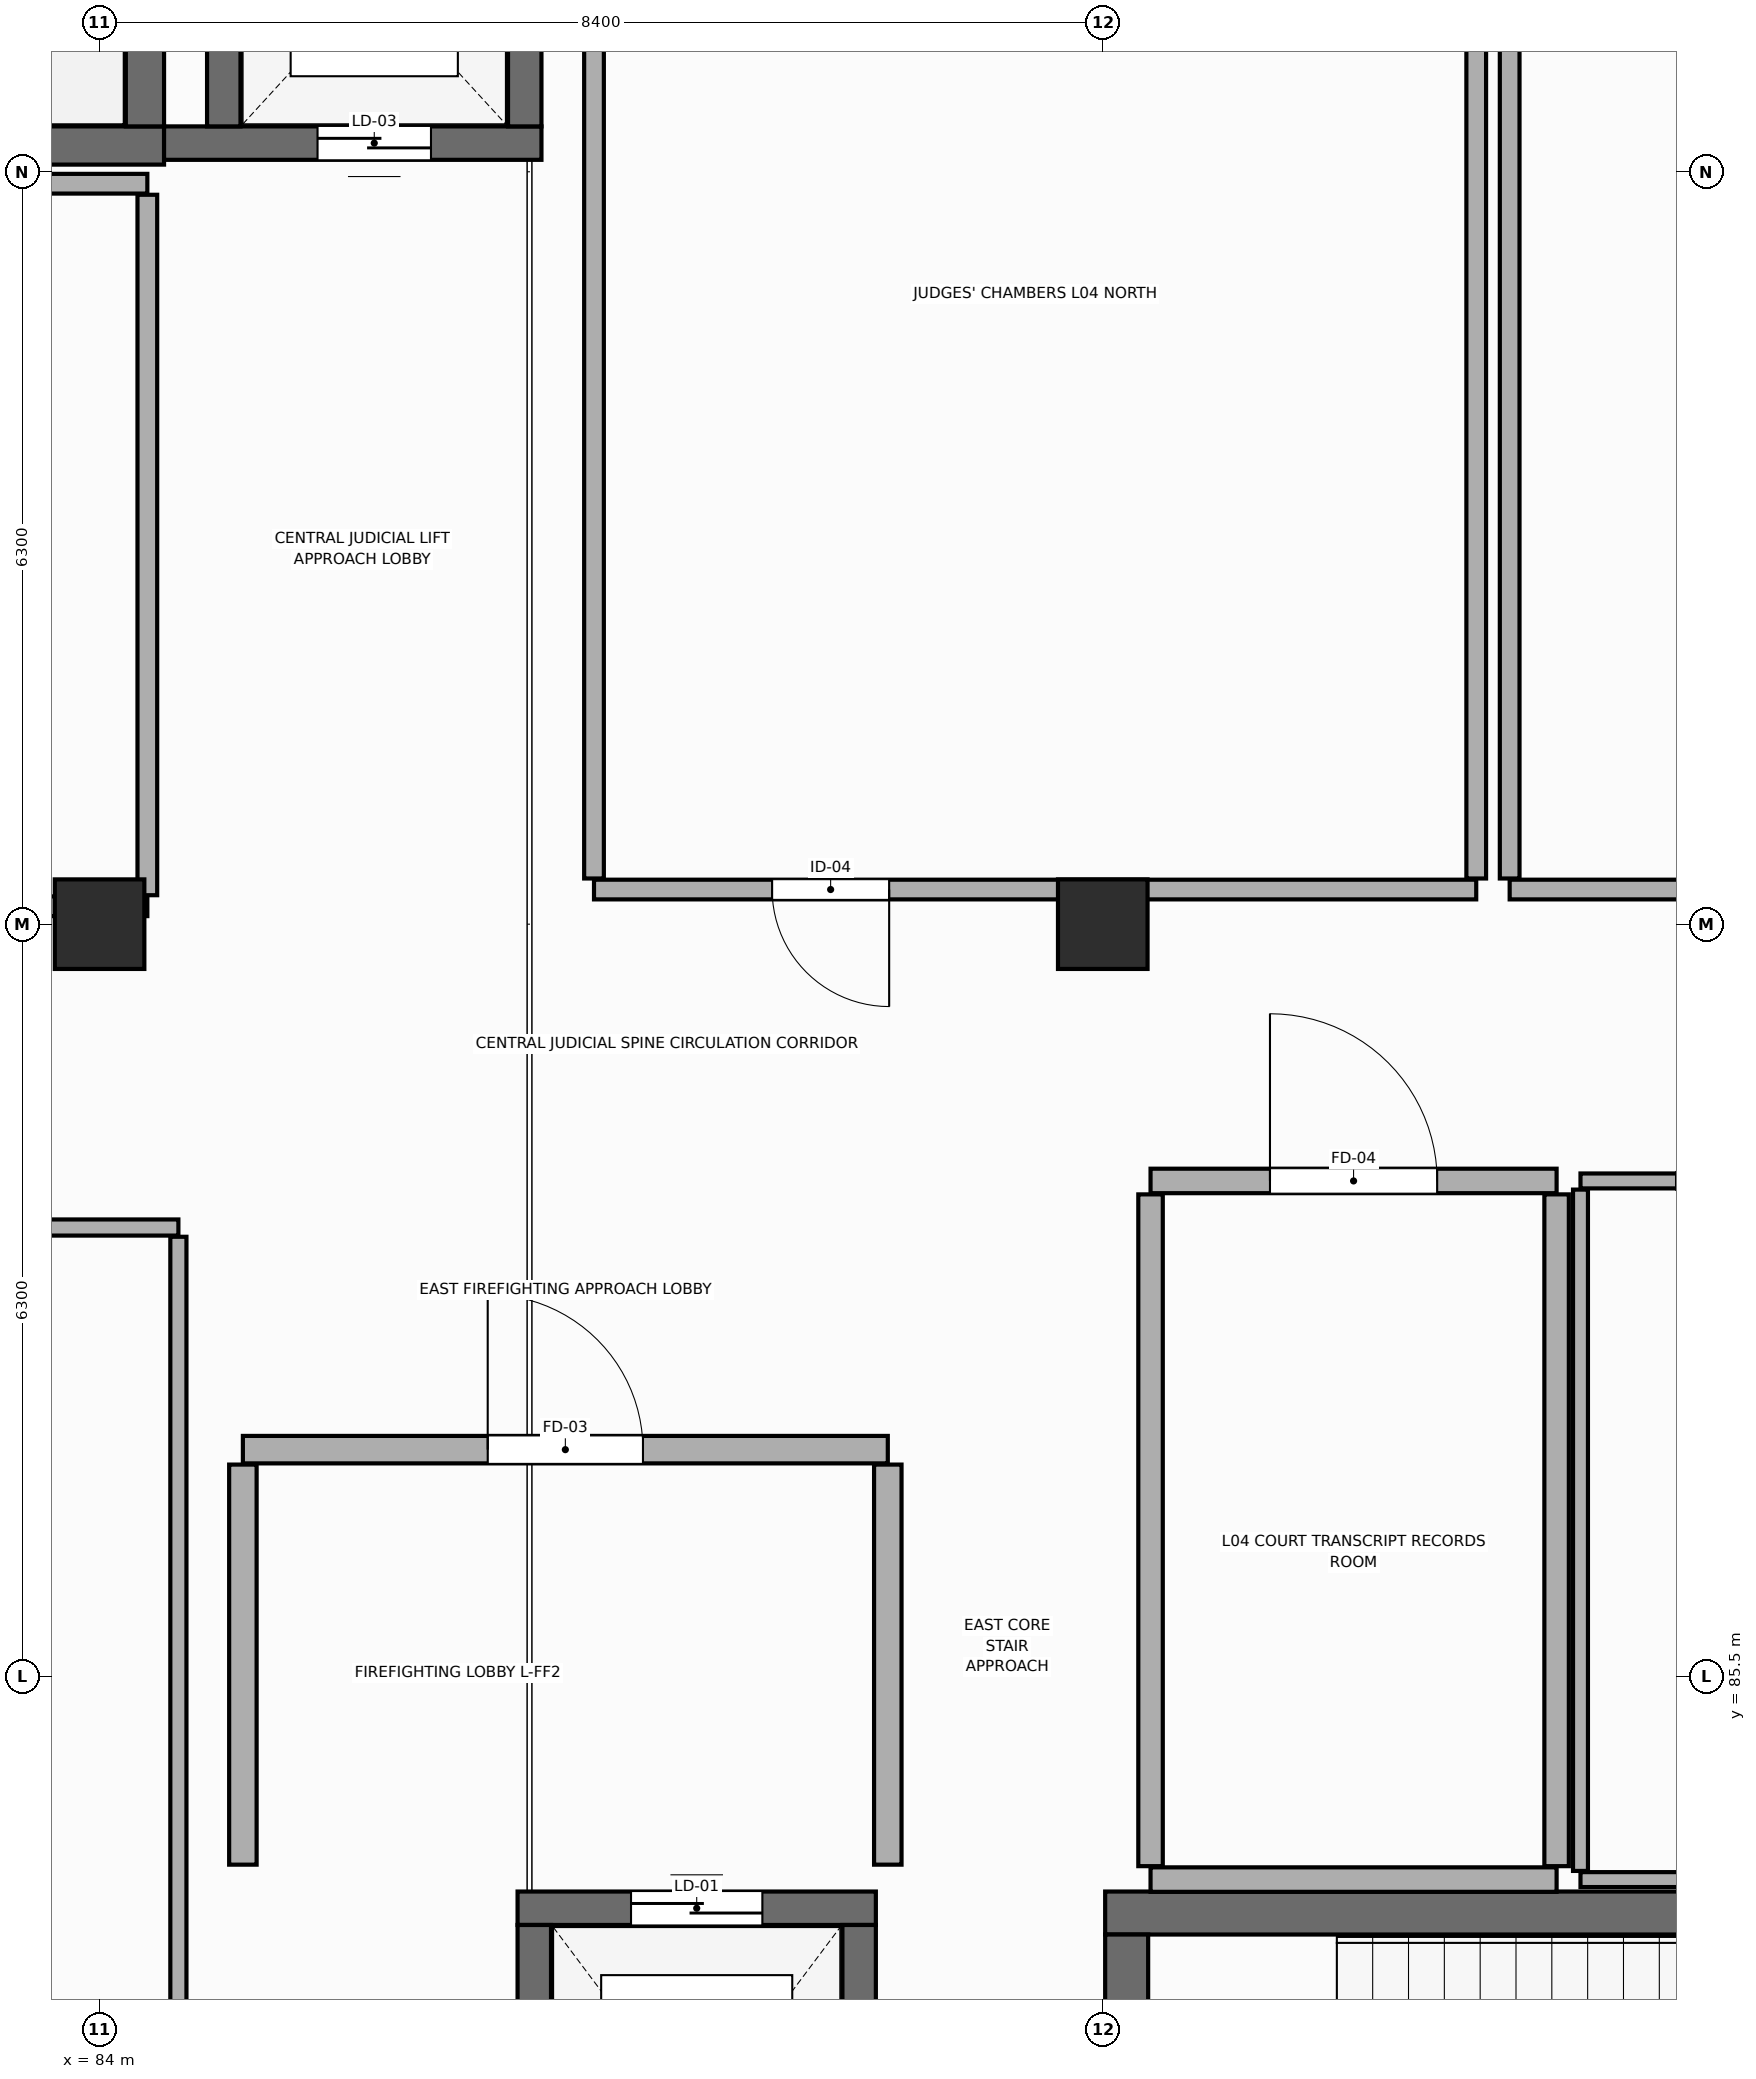
"""IFC4 building model, lengths in metres.
Left out: names, types, materials, properties, quantities, classifications, styles, units other than length and angle.
Written with IfcOpenShell. Run it as: python <this file> out.ifc"""

import sys

from ifc_helpers import new_model, si_unit, direction, frame, frame_2d, origin, origin_2d, place, context, subcontext, project, spatial, rectangle, extrude, element, fill, save


model = new_model("IFC4")
c1 = context("Model", 3, precision=1e-05, world=origin(), true_north=direction((0.0, 1.0)))
c2 = subcontext(c1, "Body", "Model", "MODEL_VIEW")
j1 = project(units=[si_unit("LENGTHUNIT", "METRE"), si_unit("PLANEANGLEUNIT", "RADIAN")], contexts=[c1])
p1 = place(None, origin())
s1 = spatial("IfcSite", under=j1, at=p1, CompositionType="ELEMENT")
p2 = place(p1, origin())
s2 = spatial("IfcBuilding", under=s1, at=p2, CompositionType="ELEMENT")
p3 = place(p2, frame((0.0, 0.0, 14.4)))
s3 = spatial("IfcBuildingStorey", under=s2, at=p3, CompositionType="ELEMENT", Elevation=14.4)
for number, where, z_axis, x_axis in (
    (1, (84.0, 91.8, 0.0), (0.0, 0.0, 1.0), (1.0, 0.0, 0.0)),
    (2, (92.4, 91.8, 0.0), (0.0, 0.0, 1.0), (1.0, 0.0, 0.0)),
):
    element("IfcColumn", number, at=place(p3, frame(where, z_axis=z_axis, x_axis=x_axis)), inside=s3, PredefinedType="COLUMN", context=c2, shape_type="SweptSolid", body=[
        extrude(rectangle(XDim=0.75, YDim=0.75, at=origin_2d()), origin(), (0.0, 0.0, 1.0), 4.2),
    ])
p4 = place(p3, frame((92.42, 83.52, 0.0), z_axis=(0.0, 0.0, 1.0), x_axis=(1.0, 0.0, 0.0)))
e3 = element("IfcWall", 3, at=p4, inside=s3, PredefinedType="SHEAR", context=c2, shape_type="SweptSolid", body=[
    extrude(rectangle(XDim=9.36, YDim=0.36, at=frame_2d((4.68, 0.0))), origin(), (0.0, 0.0, 1.0), 3.96),
])
p5 = place(p3, frame((92.6, 79.98, 0.0), z_axis=(0.0, 0.0, 1.0), x_axis=(0.0, 1.0, 0.0)))
e4 = element("IfcWall", 4, at=p5, inside=s3, PredefinedType="SHEAR", context=c2, shape_type="SweptSolid", body=[
    extrude(rectangle(XDim=3.36, YDim=0.36, at=frame_2d((1.68, 0.0))), origin(), (0.0, 0.0, 1.0), 3.96),
])
p6 = place(p5, frame((1.08, 0.0, 0.0)))
e5 = element("IfcOpeningElement", 5, at=p6, cuts=e4, PredefinedType="OPENING", context=c2, shape_type="SweptSolid", body=[
    extrude(rectangle(XDim=1.2, YDim=2.2, at=frame_2d((0.6, 1.1))), frame((0.0, 0.19, 0.0), z_axis=(0.0, -1.0, 0.0), x_axis=(1.0, 0.0, 0.0)), (0.0, 0.0, 1.0), 0.38),
])
p7 = place(p3, frame((84.54, 98.32, 0.0), z_axis=(0.0, 0.0, 1.0), x_axis=(-1.0, 0.0, 0.0)))
e6 = element("IfcWall", 6, at=p7, inside=s3, PredefinedType="SHEAR", context=c2, shape_type="SweptSolid", body=[
    extrude(rectangle(XDim=9.08, YDim=0.32, at=frame_2d((4.54, 0.0))), origin(), (0.0, 0.0, 1.0), 3.96),
])
p8 = place(p3, frame((84.38, 101.76, 0.0), z_axis=(0.0, 0.0, 1.0), x_axis=(0.0, -1.0, 0.0)))
e7 = element("IfcWall", 7, at=p8, inside=s3, PredefinedType="SHEAR", context=c2, shape_type="SweptSolid", body=[
    extrude(rectangle(XDim=3.28, YDim=0.32, at=frame_2d((1.64, 0.0))), origin(), (0.0, 0.0, 1.0), 3.96),
])
p9 = place(p3, frame((87.5, 83.56, 0.0), z_axis=(0.0, 0.0, 1.0), x_axis=(1.0, 0.0, 0.0)))
e8 = element("IfcWall", 8, at=p9, inside=s3, PredefinedType="SHEAR", context=c2, shape_type="SweptSolid", body=[
    extrude(rectangle(XDim=3.0, YDim=0.28, at=frame_2d((1.5, 0.0))), origin(), (0.0, 0.0, 1.0), 3.96),
])
p10 = place(p9, frame((0.95, 0.0, 0.0)))
e9 = element("IfcOpeningElement", 9, at=p10, cuts=e8, PredefinedType="OPENING", context=c2, shape_type="SweptSolid", body=[
    extrude(rectangle(XDim=1.1, YDim=2.2, at=frame_2d((0.55, 1.1))), frame((0.0, 0.15, 0.0), z_axis=(0.0, -1.0, 0.0), x_axis=(1.0, 0.0, 0.0)), (0.0, 0.0, 1.0), 0.3),
])
for number, where, z_axis, x_axis in (
    (10, (87.64, 80.18, 0.0), (0.0, 0.0, 1.0), (0.0, 1.0, 0.0)),
    (11, (90.36, 83.42, 0.0), (0.0, 0.0, 1.0), (0.0, -1.0, 0.0)),
):
    element("IfcWall", number, at=place(p3, frame(where, z_axis=z_axis, x_axis=x_axis)), inside=s3, PredefinedType="SHEAR", context=c2, shape_type="SweptSolid", body=[
        extrude(rectangle(XDim=3.24, YDim=0.28, at=frame_2d((1.62, 0.0))), origin(), (0.0, 0.0, 1.0), 3.96),
    ])
p11 = place(p3, frame((87.7, 98.34, 0.0), z_axis=(0.0, 0.0, 1.0), x_axis=(-1.0, 0.0, 0.0)))
e12 = element("IfcWall", 12, at=p11, inside=s3, PredefinedType="SHEAR", context=c2, shape_type="SweptSolid", body=[
    extrude(rectangle(XDim=3.16, YDim=0.28, at=frame_2d((1.58, 0.0))), origin(), (0.0, 0.0, 1.0), 3.96),
])
p12 = place(p11, frame((0.925, 0.0, 0.0)))
e13 = element("IfcOpeningElement", 13, at=p12, cuts=e12, PredefinedType="OPENING", context=c2, shape_type="SweptSolid", body=[
    extrude(rectangle(XDim=0.95, YDim=2.15, at=frame_2d((0.475, 1.075))), frame((0.0, 0.15, 0.0), z_axis=(0.0, -1.0, 0.0), x_axis=(1.0, 0.0, 0.0)), (0.0, 0.0, 1.0), 0.3),
])
for number, where, z_axis, x_axis in (
    (14, (85.04, 98.48, 0.0), (0.0, 0.0, 1.0), (0.0, 1.0, 0.0)),
    (15, (87.56, 100.92, 0.0), (0.0, 0.0, 1.0), (0.0, -1.0, 0.0)),
):
    element("IfcWall", number, at=place(p3, frame(where, z_axis=z_axis, x_axis=x_axis)), inside=s3, PredefinedType="SHEAR", context=c2, shape_type="SweptSolid", body=[
        extrude(rectangle(XDim=2.44, YDim=0.28, at=frame_2d((1.22, 0.0))), origin(), (0.0, 0.0, 1.0), 3.96),
    ])
p13 = place(p3, frame((85.2, 87.4, 0.0), z_axis=(0.0, 0.0, 1.0), x_axis=(1.0, 0.0, 0.0)))
e16 = element("IfcWall", 16, at=p13, inside=s3, PredefinedType="STANDARD", context=c2, shape_type="SweptSolid", body=[
    extrude(rectangle(XDim=5.4, YDim=0.23, at=frame_2d((2.7, 0.0))), origin(), (0.0, 0.0, 1.0), 3.34),
])
p14 = place(p13, frame((2.05, 0.0, 0.0)))
e17 = element("IfcOpeningElement", 17, at=p14, cuts=e16, PredefinedType="OPENING", context=c2, shape_type="SweptSolid", body=[
    extrude(rectangle(XDim=1.3, YDim=2.2, at=frame_2d((0.65, 1.1))), frame((0.0, 0.125, 0.0), z_axis=(0.0, -1.0, 0.0), x_axis=(1.0, 0.0, 0.0)), (0.0, 0.0, 1.0), 0.25),
])
for number, where, z_axis, x_axis in (
    (18, (85.2, 83.925, 0.0), (0.0, 0.0, 1.0), (0.0, 1.0, 0.0)),
    (19, (90.6, 87.275, 0.0), (0.0, 0.0, 1.0), (0.0, -1.0, 0.0)),
):
    element("IfcWall", number, at=place(p3, frame(where, z_axis=z_axis, x_axis=x_axis)), inside=s3, PredefinedType="STANDARD", context=c2, shape_type="SweptSolid", body=[
        extrude(rectangle(XDim=3.35, YDim=0.23, at=frame_2d((1.675, 0.0))), origin(), (0.0, 0.0, 1.0), 3.34),
    ])
p15 = place(p3, frame((96.4, 89.65, 0.0), z_axis=(0.0, 0.0, 1.0), x_axis=(1.0, 0.0, 0.0)))
e20 = element("IfcWall", 20, at=p15, inside=s3, PredefinedType="PARTITIONING", context=c2, shape_type="SweptSolid", body=[
    extrude(rectangle(XDim=2.5, YDim=0.125, at=frame_2d((1.25, 0.0))), origin(), (0.0, 0.0, 1.0), 3.945),
])
p16 = place(p15, frame((0.8, 0.0, 0.0)))
e21 = element("IfcOpeningElement", 21, at=p16, cuts=e20, PredefinedType="OPENING", context=c2, shape_type="SweptSolid", body=[
    extrude(rectangle(XDim=0.9, YDim=2.1, at=frame_2d((0.45, 1.05))), frame((0.0, 0.073, 0.0), z_axis=(0.0, -1.0, 0.0), x_axis=(1.0, 0.0, 0.0)), (0.0, 0.0, 1.0), 0.145),
])
p17 = place(p3, frame((98.9, 83.8, 0.0), z_axis=(0.0, 0.0, 1.0), x_axis=(-1.0, 0.0, 0.0)))
e22 = element("IfcWall", 22, at=p17, inside=s3, PredefinedType="PARTITIONING", context=c2, shape_type="SweptSolid", body=[
    extrude(rectangle(XDim=2.5, YDim=0.125, at=frame_2d((1.25, 0.0))), origin(), (0.0, 0.0, 1.0), 3.945),
])
p18 = place(p3, frame((96.4, 83.873, 0.0), z_axis=(0.0, 0.0, 1.0), x_axis=(0.0, 1.0, 0.0)))
e23 = element("IfcWall", 23, at=p18, inside=s3, PredefinedType="PARTITIONING", context=c2, shape_type="SweptSolid", body=[
    extrude(rectangle(XDim=5.705, YDim=0.125, at=frame_2d((2.853, 0.0))), origin(), (0.0, 0.0, 1.0), 3.34),
])
p19 = place(p3, frame((92.8, 89.65, 0.0), z_axis=(0.0, 0.0, 1.0), x_axis=(1.0, 0.0, 0.0)))
e24 = element("IfcWall", 24, at=p19, inside=s3, PredefinedType="STANDARD", context=c2, shape_type="SweptSolid", body=[
    extrude(rectangle(XDim=3.4, YDim=0.205, at=frame_2d((1.7, 0.0))), origin(), (0.0, 0.0, 1.0), 3.09),
])
p20 = place(p19, frame((1.0, 0.0, 0.0)))
e25 = element("IfcOpeningElement", 25, at=p20, cuts=e24, PredefinedType="OPENING", context=c2, shape_type="SweptSolid", body=[
    extrude(rectangle(XDim=1.4, YDim=2.25, at=frame_2d((0.7, 1.125))), frame((0.0, 0.113, 0.0), z_axis=(0.0, -1.0, 0.0), x_axis=(1.0, 0.0, 0.0)), (0.0, 0.0, 1.0), 0.225),
])
p21 = place(p3, frame((96.2, 83.8, 0.0), z_axis=(0.0, 0.0, 1.0), x_axis=(-1.0, 0.0, 0.0)))
e26 = element("IfcWall", 26, at=p21, inside=s3, PredefinedType="STANDARD", context=c2, shape_type="SweptSolid", body=[
    extrude(rectangle(XDim=3.4, YDim=0.205, at=frame_2d((1.7, 0.0))), origin(), (0.0, 0.0, 1.0), 3.09),
])
p22 = place(p3, frame((92.8, 83.913, 0.0), z_axis=(0.0, 0.0, 1.0), x_axis=(0.0, 1.0, 0.0)))
e27 = element("IfcWall", 27, at=p22, inside=s3, PredefinedType="STANDARD", context=c2, shape_type="SweptSolid", body=[
    extrude(rectangle(XDim=5.625, YDim=0.205, at=frame_2d((2.812, 0.0))), origin(), (0.0, 0.0, 1.0), 3.09),
])
p23 = place(p3, frame((96.2, 89.538, 0.0), z_axis=(0.0, 0.0, 1.0), x_axis=(0.0, -1.0, 0.0)))
e28 = element("IfcWall", 28, at=p23, inside=s3, PredefinedType="STANDARD", context=c2, shape_type="SweptSolid", body=[
    extrude(rectangle(XDim=5.625, YDim=0.205, at=frame_2d((2.812, 0.0))), origin(), (0.0, 0.0, 1.0), 3.34),
])
p24 = place(p3, frame((75.6, 98.0, 0.0), z_axis=(0.0, 0.0, 1.0), x_axis=(1.0, 0.0, 0.0)))
e29 = element("IfcWall", 29, at=p24, inside=s3, PredefinedType="PARTITIONING", context=c2, shape_type="SweptSolid", body=[
    extrude(rectangle(XDim=8.8, YDim=0.165, at=frame_2d((4.4, 0.0))), origin(), (0.0, 0.0, 1.0), 3.09),
])
p25 = place(p3, frame((84.4, 91.95, 0.0), z_axis=(0.0, 0.0, 1.0), x_axis=(-1.0, 0.0, 0.0)))
e30 = element("IfcWall", 30, at=p25, inside=s3, PredefinedType="PARTITIONING", context=c2, shape_type="SweptSolid", body=[
    extrude(rectangle(XDim=8.8, YDim=0.165, at=frame_2d((4.4, 0.0))), origin(), (0.0, 0.0, 1.0), 3.09),
])
p26 = place(p25, frame((3.545, 0.0, 0.0)))
e31 = element("IfcOpeningElement", 31, at=p26, cuts=e30, PredefinedType="OPENING", context=c2, shape_type="SweptSolid", body=[
    extrude(rectangle(XDim=1.0, YDim=2.15, at=frame_2d((0.5, 1.075))), frame((0.0, 0.093, 0.0), z_axis=(0.0, -1.0, 0.0), x_axis=(1.0, 0.0, 0.0)), (0.0, 0.0, 1.0), 0.185),
])
p27 = place(p3, frame((84.4, 97.907, 0.0), z_axis=(0.0, 0.0, 1.0), x_axis=(0.0, -1.0, 0.0)))
e32 = element("IfcWall", 32, at=p27, inside=s3, PredefinedType="PARTITIONING", context=c2, shape_type="SweptSolid", body=[
    extrude(rectangle(XDim=5.865, YDim=0.165, at=frame_2d((2.933, 0.0))), origin(), (0.0, 0.0, 1.0), 3.09),
])
p28 = place(p3, frame((95.527, 92.09, 0.0), z_axis=(0.0, 0.0, 1.0), x_axis=(-1.0, 0.0, 0.0)))
e33 = element("IfcWall", 33, at=p28, inside=s3, PredefinedType="PARTITIONING", context=c2, shape_type="SweptSolid", body=[
    extrude(rectangle(XDim=7.387, YDim=0.165, at=frame_2d((3.694, 0.0))), origin(), (0.0, 0.0, 1.0), 3.09),
])
p29 = place(p28, frame((4.916, 0.0, 0.0)))
e34 = element("IfcOpeningElement", 34, at=p29, cuts=e33, PredefinedType="OPENING", context=c2, shape_type="SweptSolid", body=[
    extrude(rectangle(XDim=0.98, YDim=2.2, at=frame_2d((0.49, 1.1))), frame((0.0, 0.093, 0.0), z_axis=(0.0, -1.0, 0.0), x_axis=(1.0, 0.0, 0.0)), (0.0, 0.0, 1.0), 0.185),
])
p30 = place(p3, frame((88.14, 92.183, 0.0), z_axis=(0.0, 0.0, 1.0), x_axis=(0.0, 1.0, 0.0)))
e35 = element("IfcWall", 35, at=p30, inside=s3, PredefinedType="PARTITIONING", context=c2, shape_type="SweptSolid", body=[
    extrude(rectangle(XDim=11.798, YDim=0.165, at=frame_2d((5.899, 0.0))), origin(), (0.0, 0.0, 1.0), 3.39),
])
p31 = place(p3, frame((95.527, 103.981, 0.0), z_axis=(0.0, 0.0, 1.0), x_axis=(0.0, -1.0, 0.0)))
e36 = element("IfcWall", 36, at=p31, inside=s3, PredefinedType="PARTITIONING", context=c2, shape_type="SweptSolid", body=[
    extrude(rectangle(XDim=11.798, YDim=0.165, at=frame_2d((5.899, 0.0))), origin(), (0.0, 0.0, 1.0), 3.29),
])
p32 = place(p3, frame((101.66, 92.09, 0.0), z_axis=(0.0, 0.0, 1.0), x_axis=(-1.0, 0.0, 0.0)))
e37 = element("IfcWall", 37, at=p32, inside=s3, PredefinedType="PARTITIONING", context=c2, shape_type="SweptSolid", body=[
    extrude(rectangle(XDim=5.853, YDim=0.165, at=frame_2d((2.927, 0.0))), origin(), (0.0, 0.0, 1.0), 3.09),
])
p33 = place(p32, frame((2.634, 0.0, 0.0)))
e38 = element("IfcOpeningElement", 38, at=p33, cuts=e37, PredefinedType="OPENING", context=c2, shape_type="SweptSolid", body=[
    extrude(rectangle(XDim=1.0, YDim=2.15, at=frame_2d((0.5, 1.075))), frame((0.0, 0.093, 0.0), z_axis=(0.0, -1.0, 0.0), x_axis=(1.0, 0.0, 0.0)), (0.0, 0.0, 1.0), 0.185),
])
p34 = place(p3, frame((95.807, 92.183, 0.0), z_axis=(0.0, 0.0, 1.0), x_axis=(0.0, 1.0, 0.0)))
e39 = element("IfcWall", 39, at=p34, inside=s3, PredefinedType="PARTITIONING", context=c2, shape_type="SweptSolid", body=[
    extrude(rectangle(XDim=11.798, YDim=0.165, at=frame_2d((5.899, 0.0))), origin(), (0.0, 0.0, 1.0), 3.29),
])
p35 = place(p3, frame((79.94, 89.26, 0.0), z_axis=(0.0, 0.0, 1.0), x_axis=(1.0, 0.0, 0.0)))
e40 = element("IfcWall", 40, at=p35, inside=s3, PredefinedType="PARTITIONING", context=c2, shape_type="SweptSolid", body=[
    extrude(rectangle(XDim=4.72, YDim=0.135, at=frame_2d((2.36, 0.0))), origin(), (0.0, 0.0, 1.0), 3.09),
])
p36 = place(p35, frame((1.55, 0.0, 0.0)))
e41 = element("IfcOpeningElement", 41, at=p36, cuts=e40, PredefinedType="OPENING", context=c2, shape_type="SweptSolid", body=[
    extrude(rectangle(XDim=1.02, YDim=2.15, at=frame_2d((0.51, 1.075))), frame((0.0, 0.077, 0.0), z_axis=(0.0, -1.0, 0.0), x_axis=(1.0, 0.0, 0.0)), (0.0, 0.0, 1.0), 0.155),
])
p37 = place(p3, frame((84.66, 89.183, 0.0), z_axis=(0.0, 0.0, 1.0), x_axis=(0.0, -1.0, 0.0)))
e42 = element("IfcWall", 42, at=p37, inside=s3, PredefinedType="PARTITIONING", context=c2, shape_type="SweptSolid", body=[
    extrude(rectangle(XDim=9.564, YDim=0.135, at=frame_2d((4.782, 0.0))), origin(), (0.0, 0.0, 1.0), 3.34),
])
p38 = place(p10, origin())
e43 = element("IfcDoor", 43, at=p38, inside=s3, OperationType="DOUBLE_DOOR_SLIDING", PredefinedType="DOOR", context=c2, shape_type="SweptSolid", body=[
    extrude(rectangle(XDim=1.1, YDim=2.2, at=frame_2d((0.55, 1.1))), frame((0.0, 0.025, 0.0), z_axis=(0.0, -1.0, 0.0), x_axis=(1.0, 0.0, 0.0)), (0.0, 0.0, 1.0), 0.05),
])
fill(e9, e43)
p39 = place(p12, origin())
e44 = element("IfcDoor", 44, at=p39, inside=s3, OperationType="DOUBLE_DOOR_SLIDING", PredefinedType="DOOR", context=c2, shape_type="SweptSolid", body=[
    extrude(rectangle(XDim=0.95, YDim=2.15, at=frame_2d((0.475, 1.075))), frame((0.0, 0.025, 0.0), z_axis=(0.0, -1.0, 0.0), x_axis=(1.0, 0.0, 0.0)), (0.0, 0.0, 1.0), 0.05),
])
fill(e13, e44)
p40 = place(p14, origin())
e45 = element("IfcDoor", 45, at=p40, inside=s3, OperationType="SINGLE_SWING_LEFT", PredefinedType="DOOR", context=c2, shape_type="SweptSolid", body=[
    extrude(rectangle(XDim=1.3, YDim=2.2, at=frame_2d((0.65, 1.1))), frame((0.0, 0.025, 0.0), z_axis=(0.0, -1.0, 0.0), x_axis=(1.0, 0.0, 0.0)), (0.0, 0.0, 1.0), 0.05),
])
fill(e17, e45)
p41 = place(p20, origin())
e46 = element("IfcDoor", 46, at=p41, inside=s3, OperationType="SINGLE_SWING_LEFT", PredefinedType="DOOR", context=c2, shape_type="SweptSolid", body=[
    extrude(rectangle(XDim=1.4, YDim=2.25, at=frame_2d((0.7, 1.125))), frame((0.0, 0.025, 0.0), z_axis=(0.0, -1.0, 0.0), x_axis=(1.0, 0.0, 0.0)), (0.0, 0.0, 1.0), 0.05),
])
fill(e25, e46)
p42 = place(p29, origin())
e47 = element("IfcDoor", 47, at=p42, inside=s3, OperationType="SINGLE_SWING_LEFT", PredefinedType="DOOR", context=c2, shape_type="SweptSolid", body=[
    extrude(rectangle(XDim=0.98, YDim=2.2, at=frame_2d((0.49, 1.1))), frame((0.0, 0.025, 0.0), z_axis=(0.0, -1.0, 0.0), x_axis=(1.0, 0.0, 0.0)), (0.0, 0.0, 1.0), 0.05),
])
fill(e34, e47)
save(model, sys.argv[1])
